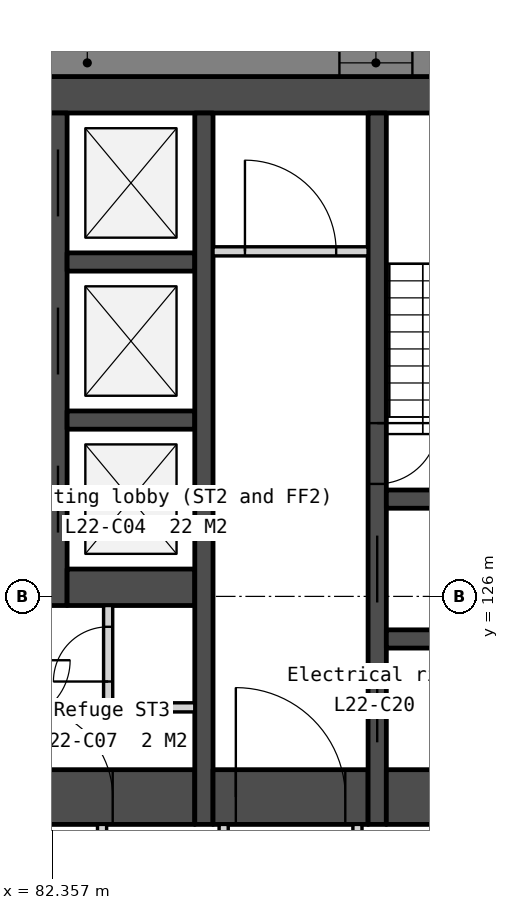
"""IFC4 building model, lengths in metres.
Left out: names, types, materials, properties, quantities, classifications, styles, units other than length and angle.
Written with IfcOpenShell. Run it as: python <this file> out.ifc"""

import sys

from ifc_helpers import new_model, si_unit, direction, frame, frame_2d, origin, place, context, subcontext, project, spatial, polyline, rectangle, outline, extrude, element, fill, save


model = new_model("IFC4")
c1 = context("Model", 3, precision=1e-05, world=origin(), true_north=direction((0.0, 1.0)))
c2 = subcontext(c1, "Body", "Model", "MODEL_VIEW")
j1 = project(units=[si_unit("LENGTHUNIT", "METRE"), si_unit("PLANEANGLEUNIT", "RADIAN")], contexts=[c1])
p1 = place(None, origin())
s1 = spatial("IfcSite", under=j1, at=p1, CompositionType="ELEMENT")
p2 = place(p1, origin())
s2 = spatial("IfcBuilding", under=s1, at=p2, CompositionType="ELEMENT")
p3 = place(p2, frame((0.0, 0.0, 92.3)))
s3 = spatial("IfcBuildingStorey", under=s2, at=p3, CompositionType="ELEMENT", Elevation=92.3)
p4 = place(p3, frame((66.0, 134.25, 0.0), z_axis=(0.0, 0.0, 1.0), x_axis=(1.0, 0.0, 0.0)))
e1 = element("IfcWall", 1, at=p4, inside=s3, PredefinedType="SOLIDWALL", context=c2, shape_type="SweptSolid", body=[
    extrude(rectangle(XDim=28.0, YDim=0.6, at=frame_2d((14.0, 0.0))), origin(), (0.0, 0.0, 1.0), 3.35),
])
p5 = place(p3, frame((81.8, 122.7, 0.0), z_axis=(0.0, 0.0, 1.0), x_axis=(1.0, 0.0, 0.0)))
e2 = element("IfcWall", 2, at=p5, inside=s3, PredefinedType="SOLIDWALL", context=c2, shape_type="SweptSolid", body=[
    extrude(rectangle(XDim=2.9, YDim=0.9, at=frame_2d((1.45, 0.0))), origin(), (0.0, 0.0, 1.0), 3.35),
])
p6 = place(p5, frame((0.05, 0.0, 0.0)))
e3 = element("IfcOpeningElement", 3, at=p6, cuts=e2, PredefinedType="OPENING", context=c2, shape_type="SweptSolid", body=[
    extrude(rectangle(XDim=1.5, YDim=2.1, at=frame_2d((0.75, 1.05))), frame((0.0, 0.46, 0.0), z_axis=(0.0, -1.0, 0.0), x_axis=(1.0, 0.0, 0.0)), (0.0, 0.0, 1.0), 0.92),
])
p7 = place(p3, frame((82.45, 133.95, 0.0), z_axis=(0.0, 0.0, 1.0), x_axis=(0.0, -1.0, 0.0)))
e4 = element("IfcWall", 4, at=p7, inside=s3, PredefinedType="SOLIDWALL", context=c2, shape_type="SweptSolid", body=[
    extrude(rectangle(XDim=8.1, YDim=0.3, at=frame_2d((4.05, 0.0))), origin(), (0.0, 0.0, 1.0), 3.35),
])
p8 = place(p7, frame((0.6, 0.0, 0.0)))
e5 = element("IfcOpeningElement", 5, at=p8, cuts=e4, PredefinedType="OPENING", context=c2, shape_type="SweptSolid", body=[
    extrude(rectangle(XDim=1.1, YDim=2.1, at=frame_2d((0.55, 1.05))), frame((0.0, 0.16, 0.0), z_axis=(0.0, -1.0, 0.0), x_axis=(1.0, 0.0, 0.0)), (0.0, 0.0, 1.0), 0.32),
])
p9 = place(p7, frame((3.2, 0.0, 0.0)))
e6 = element("IfcOpeningElement", 6, at=p9, cuts=e4, PredefinedType="OPENING", context=c2, shape_type="SweptSolid", body=[
    extrude(rectangle(XDim=1.1, YDim=2.1, at=frame_2d((0.55, 1.05))), frame((0.0, 0.16, 0.0), z_axis=(0.0, -1.0, 0.0), x_axis=(1.0, 0.0, 0.0)), (0.0, 0.0, 1.0), 0.32),
])
p10 = place(p7, frame((5.8, 0.0, 0.0)))
e7 = element("IfcOpeningElement", 7, at=p10, cuts=e4, PredefinedType="OPENING", context=c2, shape_type="SweptSolid", body=[
    extrude(rectangle(XDim=1.1, YDim=2.1, at=frame_2d((0.55, 1.05))), frame((0.0, 0.16, 0.0), z_axis=(0.0, -1.0, 0.0), x_axis=(1.0, 0.0, 0.0)), (0.0, 0.0, 1.0), 0.32),
])
for number, where, z_axis, x_axis in (
    (8, (82.6, 131.5, 0.0), (0.0, 0.0, 1.0), (1.0, 0.0, 0.0)),
    (9, (82.6, 128.9, 0.0), (0.0, 0.0, 1.0), (1.0, 0.0, 0.0)),
):
    element("IfcWall", number, at=place(p3, frame(where, z_axis=z_axis, x_axis=x_axis)), inside=s3, PredefinedType="SOLIDWALL", context=c2, shape_type="SweptSolid", body=[
        extrude(rectangle(XDim=2.1, YDim=0.3, at=frame_2d((1.05, 0.0))), origin(), (0.0, 0.0, 1.0), 3.35),
    ])
p11 = place(p3, frame((82.6, 126.15, 0.0), z_axis=(0.0, 0.0, 1.0), x_axis=(1.0, 0.0, 0.0)))
e10 = element("IfcWall", 10, at=p11, inside=s3, PredefinedType="SOLIDWALL", context=c2, shape_type="SweptSolid", body=[
    extrude(rectangle(XDim=2.1, YDim=0.6, at=frame_2d((1.05, 0.0))), origin(), (0.0, 0.0, 1.0), 3.35),
])
p12 = place(p3, frame((83.175, 122.25, 0.0), z_axis=(0.0, 0.0, 1.0), x_axis=(0.0, -1.0, 0.0)))
e11 = element("IfcWall", 11, at=p12, inside=s3, PredefinedType="PARTITIONING", context=c2, shape_type="SweptSolid", body=[
    extrude(rectangle(XDim=2.1, YDim=0.15, at=frame_2d((1.05, 0.0))), origin(), (0.0, 0.0, 1.0), 3.35),
])
p13 = place(p3, frame((83.275, 125.85, 0.0), z_axis=(0.0, 0.0, 1.0), x_axis=(0.0, -1.0, 0.0)))
e12 = element("IfcWall", 12, at=p13, inside=s3, PredefinedType="PARTITIONING", context=c2, shape_type="SweptSolid", body=[
    extrude(rectangle(XDim=1.75, YDim=0.15, at=frame_2d((0.875, 0.0))), origin(), (0.0, 0.0, 1.0), 3.35),
])
p14 = place(p13, frame((0.35, 0.0, 0.0)))
e13 = element("IfcOpeningElement", 13, at=p14, cuts=e12, PredefinedType="OPENING", context=c2, shape_type="SweptSolid", body=[
    extrude(rectangle(XDim=0.9, YDim=2.1, at=frame_2d((0.45, 1.05))), frame((0.0, 0.085, 0.0), z_axis=(0.0, -1.0, 0.0), x_axis=(1.0, 0.0, 0.0)), (0.0, 0.0, 1.0), 0.17),
])
p15 = place(p3, frame((83.35, 124.175, 0.0), z_axis=(0.0, 0.0, 1.0), x_axis=(1.0, 0.0, 0.0)))
e14 = element("IfcWall", 14, at=p15, inside=s3, PredefinedType="PARTITIONING", context=c2, shape_type="SweptSolid", body=[
    extrude(rectangle(XDim=1.35, YDim=0.15, at=frame_2d((0.675, 0.0))), origin(), (0.0, 0.0, 1.0), 3.35),
])
p16 = place(p3, frame((84.85, 133.95, 0.0), z_axis=(0.0, 0.0, 1.0), x_axis=(0.0, -1.0, 0.0)))
e15 = element("IfcWall", 15, at=p16, inside=s3, PredefinedType="SOLIDWALL", context=c2, shape_type="SweptSolid", body=[
    extrude(rectangle(XDim=11.7, YDim=0.3, at=frame_2d((5.85, 0.0))), origin(), (0.0, 0.0, 1.0), 3.35),
])
p17 = place(p3, frame((85.0, 131.675, 0.0), z_axis=(0.0, 0.0, 1.0), x_axis=(1.0, 0.0, 0.0)))
e16 = element("IfcWall", 16, at=p17, inside=s3, PredefinedType="PARTITIONING", context=c2, shape_type="SweptSolid", body=[
    extrude(rectangle(XDim=2.55, YDim=0.15, at=frame_2d((1.275, 0.0))), origin(), (0.0, 0.0, 1.0), 3.35),
])
p18 = place(p17, frame((0.525, 0.0, 0.0)))
e17 = element("IfcOpeningElement", 17, at=p18, cuts=e16, PredefinedType="OPENING", context=c2, shape_type="SweptSolid", body=[
    extrude(rectangle(XDim=1.5, YDim=2.1, at=frame_2d((0.75, 1.05))), frame((0.0, 0.085, 0.0), z_axis=(0.0, -1.0, 0.0), x_axis=(1.0, 0.0, 0.0)), (0.0, 0.0, 1.0), 0.17),
])
p19 = place(p3, frame((85.0, 122.7, 0.0), z_axis=(0.0, 0.0, 1.0), x_axis=(1.0, 0.0, 0.0)))
e18 = element("IfcWall", 18, at=p19, inside=s3, PredefinedType="SOLIDWALL", context=c2, shape_type="SweptSolid", body=[
    extrude(rectangle(XDim=2.55, YDim=0.9, at=frame_2d((1.275, 0.0))), origin(), (0.0, 0.0, 1.0), 3.35),
])
p20 = place(p19, frame((0.375, 0.0, 0.0)))
e19 = element("IfcOpeningElement", 19, at=p20, cuts=e18, PredefinedType="OPENING", context=c2, shape_type="SweptSolid", body=[
    extrude(rectangle(XDim=1.8, YDim=2.1, at=frame_2d((0.9, 1.05))), frame((0.0, 0.46, 0.0), z_axis=(0.0, -1.0, 0.0), x_axis=(1.0, 0.0, 0.0)), (0.0, 0.0, 1.0), 0.92),
])
p21 = place(p3, frame((85.175, 122.25, 0.0), z_axis=(0.0, 0.0, 1.0), x_axis=(0.0, -1.0, 0.0)))
e20 = element("IfcWall", 20, at=p21, inside=s3, PredefinedType="PARTITIONING", context=c2, shape_type="SweptSolid", body=[
    extrude(rectangle(XDim=2.1, YDim=0.15, at=frame_2d((1.05, 0.0))), origin(), (0.0, 0.0, 1.0), 3.35),
])
p22 = place(p21, frame((0.55, 0.0, 0.0)))
e21 = element("IfcOpeningElement", 21, at=p22, cuts=e20, PredefinedType="OPENING", context=c2, shape_type="SweptSolid", body=[
    extrude(rectangle(XDim=1.0, YDim=2.1, at=frame_2d((0.5, 1.05))), frame((0.0, 0.085, 0.0), z_axis=(0.0, -1.0, 0.0), x_axis=(1.0, 0.0, 0.0)), (0.0, 0.0, 1.0), 0.17),
])
p23 = place(p3, frame((87.375, 122.25, 0.0), z_axis=(0.0, 0.0, 1.0), x_axis=(0.0, -1.0, 0.0)))
e22 = element("IfcWall", 22, at=p23, inside=s3, PredefinedType="PARTITIONING", context=c2, shape_type="SweptSolid", body=[
    extrude(rectangle(XDim=2.1, YDim=0.15, at=frame_2d((1.05, 0.0))), origin(), (0.0, 0.0, 1.0), 3.35),
])
p24 = place(p3, frame((87.7, 133.95, 0.0), z_axis=(0.0, 0.0, 1.0), x_axis=(0.0, -1.0, 0.0)))
e23 = element("IfcWall", 23, at=p24, inside=s3, PredefinedType="SOLIDWALL", context=c2, shape_type="SweptSolid", body=[
    extrude(rectangle(XDim=11.7, YDim=0.3, at=frame_2d((5.85, 0.0))), origin(), (0.0, 0.0, 1.0), 3.35),
])
p25 = place(p24, frame((6.95, 0.0, 0.0)))
e24 = element("IfcOpeningElement", 24, at=p25, cuts=e23, PredefinedType="OPENING", context=c2, shape_type="SweptSolid", body=[
    extrude(rectangle(XDim=1.1, YDim=2.1, at=frame_2d((0.55, 1.05))), frame((0.0, 0.16, 0.0), z_axis=(0.0, -1.0, 0.0), x_axis=(1.0, 0.0, 0.0)), (0.0, 0.0, 1.0), 0.32),
])
p26 = place(p24, frame((5.1, 0.0, 0.0)))
e25 = element("IfcOpeningElement", 25, at=p26, cuts=e23, PredefinedType="OPENING", context=c2, shape_type="SweptSolid", body=[
    extrude(rectangle(XDim=1.0, YDim=2.1, at=frame_2d((0.5, 1.05))), frame((0.0, 0.16, 0.0), z_axis=(0.0, -1.0, 0.0), x_axis=(1.0, 0.0, 0.0)), (0.0, 0.0, 1.0), 0.32),
])
p27 = place(p24, frame((9.25, 0.0, 0.0)))
e26 = element("IfcOpeningElement", 26, at=p27, cuts=e23, PredefinedType="OPENING", context=c2, shape_type="SweptSolid", body=[
    extrude(rectangle(XDim=1.1, YDim=2.1, at=frame_2d((0.55, 1.05))), frame((0.0, 0.16, 0.0), z_axis=(0.0, -1.0, 0.0), x_axis=(1.0, 0.0, 0.0)), (0.0, 0.0, 1.0), 0.32),
])
for number, where, z_axis, x_axis in (
    (27, (87.85, 127.6, 0.0), (0.0, 0.0, 1.0), (1.0, 0.0, 0.0)),
    (28, (87.85, 125.3, 0.0), (0.0, 0.0, 1.0), (1.0, 0.0, 0.0)),
):
    element("IfcWall", number, at=place(p3, frame(where, z_axis=z_axis, x_axis=x_axis)), inside=s3, PredefinedType="SOLIDWALL", context=c2, shape_type="SweptSolid", body=[
        extrude(rectangle(XDim=2.55, YDim=0.3, at=frame_2d((1.275, 0.0))), origin(), (0.0, 0.0, 1.0), 3.35),
    ])
p28 = place(p3, frame((87.85, 122.7, 0.0), z_axis=(0.0, 0.0, 1.0), x_axis=(1.0, 0.0, 0.0)))
e29 = element("IfcWall", 29, at=p28, inside=s3, PredefinedType="SOLIDWALL", context=c2, shape_type="SweptSolid", body=[
    extrude(rectangle(XDim=2.55, YDim=0.9, at=frame_2d((1.275, 0.0))), origin(), (0.0, 0.0, 1.0), 3.35),
])
p29 = place(p3, frame((101.322, 134.775, -0.15), z_axis=(0.0, 0.0, 1.0), x_axis=(-1.0, 0.0, 0.0)))
e30 = element("IfcWall", 30, at=p29, inside=s3, PredefinedType="SOLIDWALL", context=c2, shape_type="SweptSolid", body=[
    extrude(outline(polyline([(0.0, 0.0), (0.0, 3.5), (36.779, 3.5), (36.779, 0.0), (0.0, 0.0)])), frame((0.0, 0.225, 0.0), z_axis=(0.0, -1.0, 0.0), x_axis=(1.0, 0.0, 0.0)), (0.0, 0.0, 1.0), 0.45),
])
p30 = place(p29, frame((2.814, 0.0, 1.05)))
e31 = element("IfcOpeningElement", 31, at=p30, cuts=e30, PredefinedType="OPENING", context=c2, shape_type="SweptSolid", body=[
    extrude(rectangle(XDim=1.2, YDim=1.5, at=frame_2d((0.6, 0.75))), frame((0.0, 0.235, 0.0), z_axis=(0.0, -1.0, 0.0), x_axis=(1.0, 0.0, 0.0)), (0.0, 0.0, 1.0), 0.47),
])
p31 = place(p29, frame((4.514, 0.0, 1.05)))
e32 = element("IfcOpeningElement", 32, at=p31, cuts=e30, PredefinedType="OPENING", context=c2, shape_type="SweptSolid", body=[
    extrude(rectangle(XDim=1.2, YDim=1.5, at=frame_2d((0.6, 0.75))), frame((0.0, 0.235, 0.0), z_axis=(0.0, -1.0, 0.0), x_axis=(1.0, 0.0, 0.0)), (0.0, 0.0, 1.0), 0.47),
])
p32 = place(p29, frame((11.343, 0.0, 1.05)))
e33 = element("IfcOpeningElement", 33, at=p32, cuts=e30, PredefinedType="OPENING", context=c2, shape_type="SweptSolid", body=[
    extrude(rectangle(XDim=1.2, YDim=1.5, at=frame_2d((0.6, 0.75))), frame((0.0, 0.235, 0.0), z_axis=(0.0, -1.0, 0.0), x_axis=(1.0, 0.0, 0.0)), (0.0, 0.0, 1.0), 0.47),
])
p33 = place(p29, frame((13.043, 0.0, 1.05)))
e34 = element("IfcOpeningElement", 34, at=p33, cuts=e30, PredefinedType="OPENING", context=c2, shape_type="SweptSolid", body=[
    extrude(rectangle(XDim=1.2, YDim=1.5, at=frame_2d((0.6, 0.75))), frame((0.0, 0.235, 0.0), z_axis=(0.0, -1.0, 0.0), x_axis=(1.0, 0.0, 0.0)), (0.0, 0.0, 1.0), 0.47),
])
p34 = place(p29, frame((19.872, 0.0, 1.05)))
e35 = element("IfcOpeningElement", 35, at=p34, cuts=e30, PredefinedType="OPENING", context=c2, shape_type="SweptSolid", body=[
    extrude(rectangle(XDim=1.2, YDim=1.5, at=frame_2d((0.6, 0.75))), frame((0.0, 0.235, 0.0), z_axis=(0.0, -1.0, 0.0), x_axis=(1.0, 0.0, 0.0)), (0.0, 0.0, 1.0), 0.47),
])
p35 = place(p29, frame((21.572, 0.0, 1.05)))
e36 = element("IfcOpeningElement", 36, at=p35, cuts=e30, PredefinedType="OPENING", context=c2, shape_type="SweptSolid", body=[
    extrude(rectangle(XDim=1.2, YDim=1.5, at=frame_2d((0.6, 0.75))), frame((0.0, 0.235, 0.0), z_axis=(0.0, -1.0, 0.0), x_axis=(1.0, 0.0, 0.0)), (0.0, 0.0, 1.0), 0.47),
])
p36 = place(p29, frame((28.4, 0.0, 1.05)))
e37 = element("IfcOpeningElement", 37, at=p36, cuts=e30, PredefinedType="OPENING", context=c2, shape_type="SweptSolid", body=[
    extrude(rectangle(XDim=1.2, YDim=1.5, at=frame_2d((0.6, 0.75))), frame((0.0, 0.235, 0.0), z_axis=(0.0, -1.0, 0.0), x_axis=(1.0, 0.0, 0.0)), (0.0, 0.0, 1.0), 0.47),
])
p37 = place(p29, frame((30.1, 0.0, 1.05)))
e38 = element("IfcOpeningElement", 38, at=p37, cuts=e30, PredefinedType="OPENING", context=c2, shape_type="SweptSolid", body=[
    extrude(rectangle(XDim=1.2, YDim=1.5, at=frame_2d((0.6, 0.75))), frame((0.0, 0.235, 0.0), z_axis=(0.0, -1.0, 0.0), x_axis=(1.0, 0.0, 0.0)), (0.0, 0.0, 1.0), 0.47),
])
p38 = place(p3, frame((82.605, 93.333, -0.15), z_axis=(0.0, 0.0, 1.0), x_axis=(0.500000478905, 0.866025127289, 0.0)))
e39 = element("IfcWall", 39, at=p38, inside=s3, PredefinedType="SOLIDWALL", context=c2, shape_type="SweptSolid", body=[
    extrude(outline(polyline([(42.643, 0.0), (42.643, 3.5), (0.0, 3.5), (0.0, 0.0), (42.643, 0.0)])), frame((0.0, 0.225, 0.0), z_axis=(0.0, -1.0, 0.0), x_axis=(1.0, 0.0, 0.0)), (0.0, 0.0, 1.0), 0.45),
])
p39 = place(p38, frame((2.814, 0.0, 1.05)))
e40 = element("IfcOpeningElement", 40, at=p39, cuts=e39, PredefinedType="OPENING", context=c2, shape_type="SweptSolid", body=[
    extrude(rectangle(XDim=1.2, YDim=1.5, at=frame_2d((0.6, 0.75))), frame((0.0, 0.235, 0.0), z_axis=(0.0, -1.0, 0.0), x_axis=(1.0, 0.0, 0.0)), (0.0, 0.0, 1.0), 0.47),
])
p40 = place(p38, frame((4.514, 0.0, 1.05)))
e41 = element("IfcOpeningElement", 41, at=p40, cuts=e39, PredefinedType="OPENING", context=c2, shape_type="SweptSolid", body=[
    extrude(rectangle(XDim=1.2, YDim=1.5, at=frame_2d((0.6, 0.75))), frame((0.0, 0.235, 0.0), z_axis=(0.0, -1.0, 0.0), x_axis=(1.0, 0.0, 0.0)), (0.0, 0.0, 1.0), 0.47),
])
p41 = place(p38, frame((11.343, 0.0, 1.05)))
e42 = element("IfcOpeningElement", 42, at=p41, cuts=e39, PredefinedType="OPENING", context=c2, shape_type="SweptSolid", body=[
    extrude(rectangle(XDim=1.2, YDim=1.5, at=frame_2d((0.6, 0.75))), frame((0.0, 0.235, 0.0), z_axis=(0.0, -1.0, 0.0), x_axis=(1.0, 0.0, 0.0)), (0.0, 0.0, 1.0), 0.47),
])
p42 = place(p38, frame((13.043, 0.0, 1.05)))
e43 = element("IfcOpeningElement", 43, at=p42, cuts=e39, PredefinedType="OPENING", context=c2, shape_type="SweptSolid", body=[
    extrude(rectangle(XDim=1.2, YDim=1.5, at=frame_2d((0.6, 0.75))), frame((0.0, 0.235, 0.0), z_axis=(0.0, -1.0, 0.0), x_axis=(1.0, 0.0, 0.0)), (0.0, 0.0, 1.0), 0.47),
])
p43 = place(p38, frame((19.872, 0.0, 1.05)))
e44 = element("IfcOpeningElement", 44, at=p43, cuts=e39, PredefinedType="OPENING", context=c2, shape_type="SweptSolid", body=[
    extrude(rectangle(XDim=1.2, YDim=1.5, at=frame_2d((0.6, 0.75))), frame((0.0, 0.235, 0.0), z_axis=(0.0, -1.0, 0.0), x_axis=(1.0, 0.0, 0.0)), (0.0, 0.0, 1.0), 0.47),
])
p44 = place(p38, frame((21.572, 0.0, 1.05)))
e45 = element("IfcOpeningElement", 45, at=p44, cuts=e39, PredefinedType="OPENING", context=c2, shape_type="SweptSolid", body=[
    extrude(rectangle(XDim=1.2, YDim=1.5, at=frame_2d((0.6, 0.75))), frame((0.0, 0.235, 0.0), z_axis=(0.0, -1.0, 0.0), x_axis=(1.0, 0.0, 0.0)), (0.0, 0.0, 1.0), 0.47),
])
p45 = place(p38, frame((28.4, 0.0, 1.05)))
e46 = element("IfcOpeningElement", 46, at=p45, cuts=e39, PredefinedType="OPENING", context=c2, shape_type="SweptSolid", body=[
    extrude(rectangle(XDim=1.2, YDim=1.5, at=frame_2d((0.6, 0.75))), frame((0.0, 0.235, 0.0), z_axis=(0.0, -1.0, 0.0), x_axis=(1.0, 0.0, 0.0)), (0.0, 0.0, 1.0), 0.47),
])
p46 = place(p38, frame((30.1, 0.0, 1.05)))
e47 = element("IfcOpeningElement", 47, at=p46, cuts=e39, PredefinedType="OPENING", context=c2, shape_type="SweptSolid", body=[
    extrude(rectangle(XDim=1.2, YDim=1.5, at=frame_2d((0.6, 0.75))), frame((0.0, 0.235, 0.0), z_axis=(0.0, -1.0, 0.0), x_axis=(1.0, 0.0, 0.0)), (0.0, 0.0, 1.0), 0.47),
])
p47 = place(p38, frame((36.929, 0.0, 1.05)))
e48 = element("IfcOpeningElement", 48, at=p47, cuts=e39, PredefinedType="OPENING", context=c2, shape_type="SweptSolid", body=[
    extrude(rectangle(XDim=1.2, YDim=1.5, at=frame_2d((0.6, 0.75))), frame((0.0, 0.235, 0.0), z_axis=(0.0, -1.0, 0.0), x_axis=(1.0, 0.0, 0.0)), (0.0, 0.0, 1.0), 0.47),
])
p48 = place(p38, frame((38.629, 0.0, 1.05)))
e49 = element("IfcOpeningElement", 49, at=p48, cuts=e39, PredefinedType="OPENING", context=c2, shape_type="SweptSolid", body=[
    extrude(rectangle(XDim=1.2, YDim=1.5, at=frame_2d((0.6, 0.75))), frame((0.0, 0.235, 0.0), z_axis=(0.0, -1.0, 0.0), x_axis=(1.0, 0.0, 0.0)), (0.0, 0.0, 1.0), 0.47),
])
p49 = place(p8, origin())
e50 = element("IfcDoor", 50, at=p49, inside=s3, OperationType="SLIDING_TO_LEFT", PredefinedType="DOOR", context=c2, shape_type="SweptSolid", body=[
    extrude(rectangle(XDim=1.1, YDim=2.1, at=frame_2d((0.55, 1.05))), frame((0.0, 0.025, 0.0), z_axis=(0.0, -1.0, 0.0), x_axis=(1.0, 0.0, 0.0)), (0.0, 0.0, 1.0), 0.05),
])
fill(e5, e50)
p50 = place(p9, origin())
e51 = element("IfcDoor", 51, at=p50, inside=s3, OperationType="SLIDING_TO_LEFT", PredefinedType="DOOR", context=c2, shape_type="SweptSolid", body=[
    extrude(rectangle(XDim=1.1, YDim=2.1, at=frame_2d((0.55, 1.05))), frame((0.0, 0.025, 0.0), z_axis=(0.0, -1.0, 0.0), x_axis=(1.0, 0.0, 0.0)), (0.0, 0.0, 1.0), 0.05),
])
fill(e6, e51)
p51 = place(p10, origin())
e52 = element("IfcDoor", 52, at=p51, inside=s3, OperationType="SLIDING_TO_LEFT", PredefinedType="DOOR", context=c2, shape_type="SweptSolid", body=[
    extrude(rectangle(XDim=1.1, YDim=2.1, at=frame_2d((0.55, 1.05))), frame((0.0, 0.025, 0.0), z_axis=(0.0, -1.0, 0.0), x_axis=(1.0, 0.0, 0.0)), (0.0, 0.0, 1.0), 0.05),
])
fill(e7, e52)
p52 = place(p25, origin())
e53 = element("IfcDoor", 53, at=p52, inside=s3, OperationType="SLIDING_TO_LEFT", PredefinedType="DOOR", context=c2, shape_type="SweptSolid", body=[
    extrude(rectangle(XDim=1.1, YDim=2.1, at=frame_2d((0.55, 1.05))), frame((0.0, 0.025, 0.0), z_axis=(0.0, -1.0, 0.0), x_axis=(1.0, 0.0, 0.0)), (0.0, 0.0, 1.0), 0.05),
])
fill(e24, e53)
p53 = place(p20, origin())
e54 = element("IfcDoor", 54, at=p53, inside=s3, OperationType="DOUBLE_DOOR_DOUBLE_SWING", PredefinedType="DOOR", context=c2, shape_type="SweptSolid", body=[
    extrude(rectangle(XDim=1.8, YDim=2.1, at=frame_2d((0.9, 1.05))), frame((0.0, 0.025, 0.0), z_axis=(0.0, -1.0, 0.0), x_axis=(1.0, 0.0, 0.0)), (0.0, 0.0, 1.0), 0.05),
])
fill(e19, e54)
p54 = place(p6, origin())
e55 = element("IfcDoor", 55, at=p54, inside=s3, OperationType="DOUBLE_DOOR_DOUBLE_SWING", PredefinedType="DOOR", context=c2, shape_type="SweptSolid", body=[
    extrude(rectangle(XDim=1.5, YDim=2.1, at=frame_2d((0.75, 1.05))), frame((0.0, 0.025, 0.0), z_axis=(0.0, -1.0, 0.0), x_axis=(1.0, 0.0, 0.0)), (0.0, 0.0, 1.0), 0.05),
])
fill(e3, e55)
p55 = place(p14, origin())
e56 = element("IfcDoor", 56, at=p55, inside=s3, OperationType="SINGLE_SWING_RIGHT", PredefinedType="DOOR", context=c2, shape_type="SweptSolid", body=[
    extrude(rectangle(XDim=0.9, YDim=2.1, at=frame_2d((0.45, 1.05))), frame((0.0, 0.025, 0.0), z_axis=(0.0, -1.0, 0.0), x_axis=(1.0, 0.0, 0.0)), (0.0, 0.0, 1.0), 0.05),
])
fill(e13, e56)
p56 = place(p18, origin())
e57 = element("IfcDoor", 57, at=p56, inside=s3, OperationType="DOUBLE_DOOR_DOUBLE_SWING", PredefinedType="DOOR", context=c2, shape_type="SweptSolid", body=[
    extrude(rectangle(XDim=1.5, YDim=2.1, at=frame_2d((0.75, 1.05))), frame((0.0, 0.025, 0.0), z_axis=(0.0, -1.0, 0.0), x_axis=(1.0, 0.0, 0.0)), (0.0, 0.0, 1.0), 0.05),
])
fill(e17, e57)
p57 = place(p26, origin())
e58 = element("IfcDoor", 58, at=p57, inside=s3, OperationType="SINGLE_SWING_LEFT", PredefinedType="DOOR", context=c2, shape_type="SweptSolid", body=[
    extrude(rectangle(XDim=1.0, YDim=2.1, at=frame_2d((0.5, 1.05))), frame((0.0, 0.025, 0.0), z_axis=(0.0, -1.0, 0.0), x_axis=(1.0, 0.0, 0.0)), (0.0, 0.0, 1.0), 0.05),
])
fill(e25, e58)
p58 = place(p27, origin())
e59 = element("IfcDoor", 59, at=p58, inside=s3, OperationType="SLIDING_TO_LEFT", PredefinedType="DOOR", context=c2, shape_type="SweptSolid", body=[
    extrude(rectangle(XDim=1.1, YDim=2.1, at=frame_2d((0.55, 1.05))), frame((0.0, 0.025, 0.0), z_axis=(0.0, -1.0, 0.0), x_axis=(1.0, 0.0, 0.0)), (0.0, 0.0, 1.0), 0.05),
])
fill(e26, e59)
p59 = place(p33, origin())
e60 = element("IfcWindow", 60, at=p59, inside=s3, PartitioningType="SINGLE_PANEL", PredefinedType="WINDOW", context=c2, shape_type="SweptSolid", body=[
    extrude(rectangle(XDim=1.2, YDim=1.5, at=frame_2d((0.6, 0.75))), frame((0.0, 0.03, 0.0), z_axis=(0.0, -1.0, 0.0), x_axis=(1.0, 0.0, 0.0)), (0.0, 0.0, 1.0), 0.06),
])
fill(e34, e60)
save(model, sys.argv[1])
